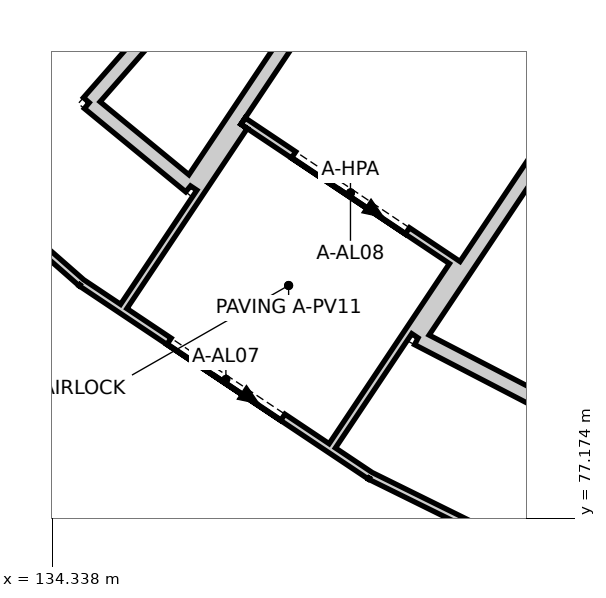
"""IFC4 building model, lengths in metres.
Left out: names, types, materials, properties, quantities, classifications, styles, units other than length and angle.
Written with IfcOpenShell. Run it as: python <this file> out.ifc"""

import sys

from ifc_helpers import new_model, si_unit, direction, frame, frame_2d, origin, place, context, subcontext, project, spatial, polyline, rectangle, outline, extrude, element, fill, save


model = new_model("IFC4")
c1 = context("Model", 3, precision=1e-05, world=origin(), true_north=direction((0.0, 1.0)))
c2 = subcontext(c1, "Body", "Model", "MODEL_VIEW")
j1 = project(units=[si_unit("LENGTHUNIT", "METRE"), si_unit("PLANEANGLEUNIT", "RADIAN")], contexts=[c1])
p1 = place(None, origin())
s1 = spatial("IfcSite", under=j1, at=p1, CompositionType="ELEMENT")
p2 = place(p1, origin())
s2 = spatial("IfcBuilding", under=s1, at=p2, CompositionType="ELEMENT")
p3 = place(p2, origin())
s3 = spatial("IfcBuildingStorey", under=s2, at=p3, CompositionType="ELEMENT", Elevation=0.0)
p4 = place(p3, frame((131.287, 83.287, 0.0), z_axis=(0.0, 0.0, 1.0), x_axis=(0.751864999433, -0.659317088075, 0.0)))
e1 = element("IfcWall", 1, at=p4, inside=s3, PredefinedType="PARTITIONING", context=c2, shape_type="SweptSolid", body=[
    extrude(outline(polyline([(-0.003, -0.05), (4.575, -0.05), (4.568, 0.05), (0.003, 0.05), (-0.003, -0.05)])), origin(), (0.0, 0.0, 1.0), 10.841),
])
p5 = place(p3, frame((134.724, 80.272, 0.0), z_axis=(0.0, 0.0, 1.0), x_axis=(0.831458299113, -0.555587164031, 0.0)))
e2 = element("IfcWall", 2, at=p5, inside=s3, PredefinedType="PARTITIONING", context=c2, shape_type="SweptSolid", body=[
    extrude(outline(polyline([(-0.003, -0.05), (4.575, -0.05), (4.569, 0.05), (0.003, 0.05), (-0.003, -0.05)])), origin(), (0.0, 0.0, 1.0), 10.842),
])
p6 = place(p5, frame((1.386, 0.0, 0.0)))
e3 = element("IfcOpeningElement", 3, at=p6, cuts=e2, PredefinedType="OPENING", context=c2, shape_type="SweptSolid", body=[
    extrude(rectangle(XDim=1.8, YDim=2.4, at=frame_2d((0.9, 1.2))), frame((0.0, 0.06, 0.0), z_axis=(0.0, -1.0, 0.0), x_axis=(1.0, 0.0, 0.0)), (0.0, 0.0, 1.0), 0.12),
])
p7 = place(p3, frame((138.525, 77.732, 0.0), z_axis=(0.0, 0.0, 1.0), x_axis=(0.896870290184, -0.442293661028, 0.0)))
e4 = element("IfcWall", 4, at=p7, inside=s3, PredefinedType="PARTITIONING", context=c2, shape_type="SweptSolid", body=[
    extrude(outline(polyline([(-0.003, -0.05), (4.575, -0.05), (4.568, 0.05), (0.003, 0.05), (-0.003, -0.05)])), origin(), (0.0, 0.0, 1.0), 10.842),
])
p8 = place(p3, frame((135.28, 79.961, 0.0), z_axis=(0.0, 0.0, 1.0), x_axis=(0.555609208993, 0.831443568068, 0.0)))
e5 = element("IfcWall", 5, at=p8, inside=s3, PredefinedType="PARTITIONING", context=c2, shape_type="SweptSolid", body=[
    extrude(rectangle(XDim=2.85, YDim=0.1, at=frame_2d((1.425, 0.0))), origin(), (0.0, 0.0, 1.0), 3.0),
])
p9 = place(p3, frame((138.024, 78.127, 0.0), z_axis=(0.0, 0.0, 1.0), x_axis=(0.555569638572, 0.8314700095, 0.0)))
e6 = element("IfcWall", 6, at=p9, inside=s3, PredefinedType="PARTITIONING", context=c2, shape_type="SweptSolid", body=[
    extrude(rectangle(XDim=2.85, YDim=0.1, at=frame_2d((1.425, 0.0))), origin(), (0.0, 0.0, 1.0), 3.0),
])
p10 = place(p3, frame((136.85, 82.4, 0.0), z_axis=(0.0, 0.0, 1.0), x_axis=(0.831464319789, -0.555578153744, 0.0)))
e7 = element("IfcWall", 7, at=p10, inside=s3, PredefinedType="PARTITIONING", context=c2, shape_type="SweptSolid", body=[
    extrude(rectangle(XDim=3.4, YDim=0.1, at=frame_2d((1.7, 0.0))), origin(), (0.0, 0.0, 1.0), 3.0),
])
p11 = place(p10, frame((0.8, 0.0, 0.0)))
e8 = element("IfcOpeningElement", 8, at=p11, cuts=e7, PredefinedType="OPENING", context=c2, shape_type="SweptSolid", body=[
    extrude(rectangle(XDim=1.8, YDim=2.4, at=frame_2d((0.9, 1.2))), frame((0.0, 0.06, 0.0), z_axis=(0.0, -1.0, 0.0), x_axis=(1.0, 0.0, 0.0)), (0.0, 0.0, 1.0), 0.12),
])
p12 = place(p3, frame((139.153, 79.547, 0.0), z_axis=(0.0, 0.0, 1.0), x_axis=(0.887682104218, -0.460456818662, 0.0)))
e9 = element("IfcWall", 9, at=p12, inside=s3, PredefinedType="SOLIDWALL", context=c2, shape_type="SweptSolid", body=[
    extrude(outline(polyline([(-0.112, -0.1), (2.912, -0.1), (2.701, 0.1), (0.112, 0.1), (-0.112, -0.1)])), origin(), (0.0, 0.0, 1.0), 0.6),
])
p13 = place(p3, frame((141.804, 83.514, 0.0), z_axis=(0.0, 0.0, 1.0), x_axis=(-0.555585568994, -0.831459364927, 0.0)))
e10 = element("IfcWall", 10, at=p13, inside=s3, PredefinedType="SOLIDWALL", context=c2, shape_type="SweptSolid", body=[
    extrude(outline(polyline([(-0.088, -0.1), (4.883, -0.1), (4.659, 0.1), (0.088, 0.1), (-0.088, -0.1)])), origin(), (0.0, 0.0, 1.0), 0.6),
])
p14 = place(p3, frame((136.159, 81.546, 0.0), z_axis=(0.0, 0.0, 1.0), x_axis=(0.555597140644, 0.831451632573, 0.0)))
e11 = element("IfcWall", 11, at=p14, inside=s3, PredefinedType="SOLIDWALL", context=c2, shape_type="SweptSolid", body=[
    extrude(outline(polyline([(-0.11, -0.1), (4.86, -0.1), (4.685, 0.1), (0.11, 0.1), (-0.11, -0.1)])), origin(), (0.0, 0.0, 1.0), 0.6),
])
p15 = place(p3, frame((137.982, 86.241, 0.0), z_axis=(0.0, 0.0, 1.0), x_axis=(-0.659324013073, -0.751858926784, 0.0)))
e12 = element("IfcWall", 12, at=p15, inside=s3, PredefinedType="SOLIDWALL", context=c2, shape_type="SweptSolid", body=[
    extrude(outline(polyline([(-0.1, -0.1), (4.889, -0.1), (4.683, 0.1), (0.1, 0.1), (-0.1, -0.1)])), origin(), (0.0, 0.0, 1.0), 0.6),
])
p16 = place(p3, frame((134.826, 82.643, 0.0), z_axis=(0.0, 0.0, 1.0), x_axis=(0.772366892507, -0.635176655237, 0.0)))
e13 = element("IfcWall", 13, at=p16, inside=s3, PredefinedType="SOLIDWALL", context=c2, shape_type="SweptSolid", body=[
    extrude(outline(polyline([(-0.103, -0.1), (1.836, -0.1), (1.616, 0.1), (0.103, 0.1), (-0.103, -0.1)])), origin(), (0.0, 0.0, 1.0), 0.6),
])
p17 = place(p6, origin())
e14 = element("IfcDoor", 14, at=p17, inside=s3, OperationType="DOUBLE_DOOR_SLIDING", PredefinedType="DOOR", context=c2, shape_type="SweptSolid", body=[
    extrude(rectangle(XDim=1.8, YDim=2.4, at=frame_2d((0.9, 1.2))), frame((0.0, 0.025, 0.0), z_axis=(0.0, -1.0, 0.0), x_axis=(1.0, 0.0, 0.0)), (0.0, 0.0, 1.0), 0.05),
])
fill(e3, e14)
p18 = place(p11, origin())
e15 = element("IfcDoor", 15, at=p18, inside=s3, OperationType="DOUBLE_DOOR_SLIDING", PredefinedType="DOOR", context=c2, shape_type="SweptSolid", body=[
    extrude(rectangle(XDim=1.8, YDim=2.4, at=frame_2d((0.9, 1.2))), frame((0.0, 0.025, 0.0), z_axis=(0.0, -1.0, 0.0), x_axis=(1.0, 0.0, 0.0)), (0.0, 0.0, 1.0), 0.05),
])
fill(e8, e15)
save(model, sys.argv[1])
